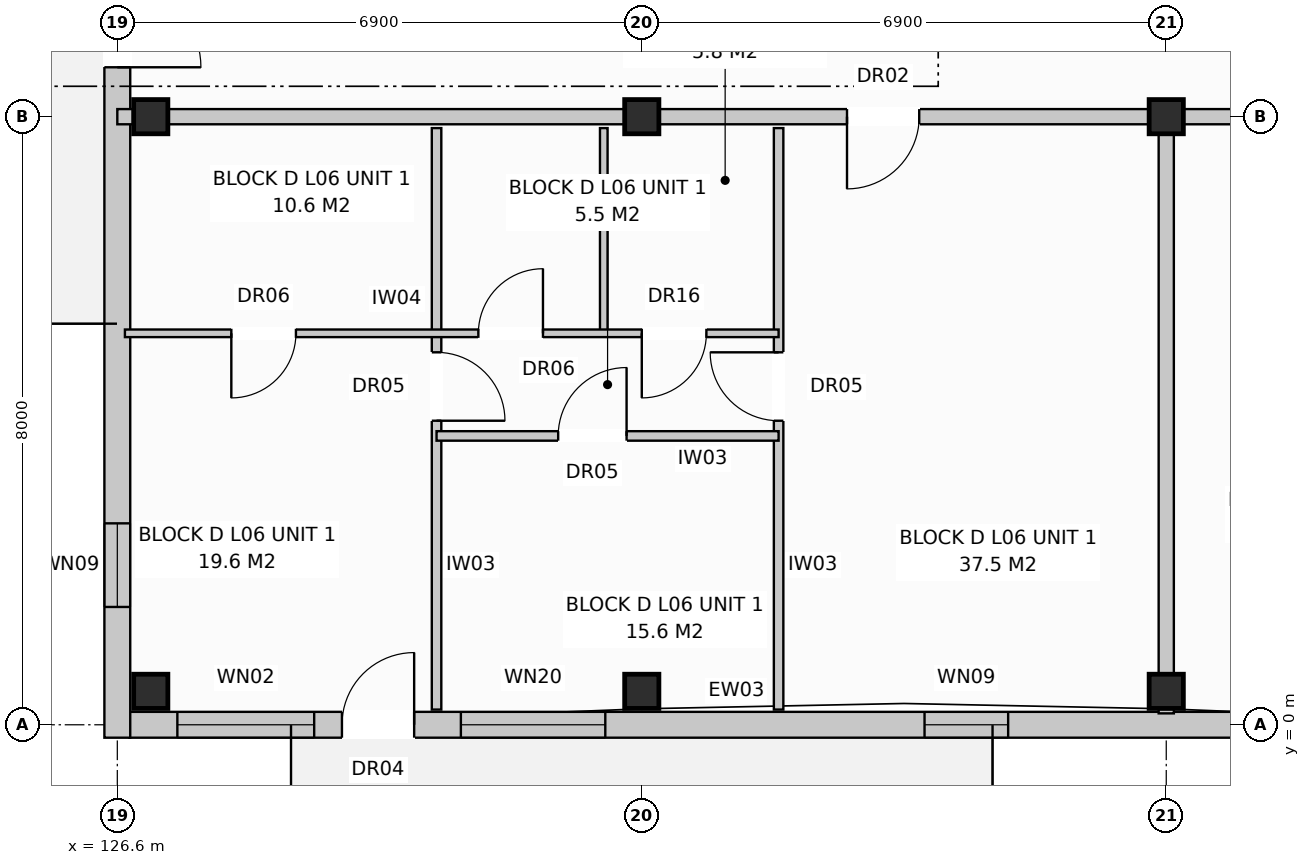
"""IFC4 building model, lengths in metres.
Left out: names, types, materials, properties, quantities, classifications, styles, units other than length and angle.
Written with IfcOpenShell. Run it as: python <this file> out.ifc"""

import sys

from ifc_helpers import new_model, si_unit, direction, frame, frame_2d, origin, origin_with_axes, origin_2d, place, context, subcontext, project, spatial, rectangle, extrude, element, fill, save


model = new_model("IFC4")
c1 = context("Model", 3, precision=1e-05, world=origin(), true_north=direction((0.0, 1.0)))
c2 = subcontext(c1, "Body", "Model", "MODEL_VIEW")
j1 = project(units=[si_unit("LENGTHUNIT", "METRE"), si_unit("PLANEANGLEUNIT", "RADIAN")], contexts=[c1])
p1 = place(None, origin())
s1 = spatial("IfcSite", under=j1, at=p1, CompositionType="ELEMENT")
p2 = place(p1, origin())
s2 = spatial("IfcBuilding", under=s1, at=p2, CompositionType="ELEMENT")
p3 = place(p2, frame((0.0, 0.0, 20.8)))
s3 = spatial("IfcBuildingStorey", under=s2, at=p3, CompositionType="ELEMENT", Elevation=20.8)
for number, where, z_axis, x_axis in (
    (1, (127.04, 0.44, 0.0), (0.0, 0.0, 1.0), (1.0, 0.0, 0.0)),
    (2, (127.04, 8.0, 0.0), (0.0, 0.0, 1.0), (1.0, 0.0, 0.0)),
    (3, (133.5, 0.44, 0.0), (0.0, 0.0, 1.0), (1.0, 0.0, 0.0)),
    (4, (133.5, 8.0, 0.0), (0.0, 0.0, 1.0), (1.0, 0.0, 0.0)),
    (5, (140.4, 0.44, 0.0), (0.0, 0.0, 1.0), (1.0, 0.0, 0.0)),
    (6, (140.4, 8.0, 0.0), (0.0, 0.0, 1.0), (1.0, 0.0, 0.0)),
):
    element("IfcColumn", number, at=place(p3, frame(where, z_axis=z_axis, x_axis=x_axis)), inside=s3, PredefinedType="COLUMN", context=c2, shape_type="SweptSolid", body=[
        extrude(rectangle(XDim=0.45, YDim=0.45, at=origin_2d()), origin(), (0.0, 0.0, 1.0), 3.2),
    ])
p4 = place(p3, frame((126.76, 0.0, 0.0), z_axis=(0.0, 0.0, 1.0), x_axis=(1.0, 0.0, 0.0)))
e7 = element("IfcWall", 7, at=p4, inside=s3, PredefinedType="STANDARD", context=c2, shape_type="SweptSolid", body=[
    extrude(rectangle(XDim=41.08, YDim=0.34, at=frame_2d((20.54, 0.0))), origin(), (0.0, 0.0, 1.0), 2.95),
])
p5 = place(p4, frame((2.795, 0.0, 0.0)))
e8 = element("IfcOpeningElement", 8, at=p5, cuts=e7, PredefinedType="OPENING", context=c2, shape_type="SweptSolid", body=[
    extrude(rectangle(XDim=0.95, YDim=2.1, at=frame_2d((0.475, 1.05))), frame((0.0, 0.182, 0.0), z_axis=(0.0, -1.0, 0.0), x_axis=(1.0, 0.0, 0.0)), (0.0, 0.0, 1.0), 0.364),
])
p6 = place(p4, frame((17.595, 0.0, 0.0)))
e9 = element("IfcOpeningElement", 9, at=p6, cuts=e7, PredefinedType="OPENING", context=c2, shape_type="SweptSolid", body=[
    extrude(rectangle(XDim=0.95, YDim=2.1, at=frame_2d((0.475, 1.05))), frame((0.0, 0.182, 0.0), z_axis=(0.0, -1.0, 0.0), x_axis=(1.0, 0.0, 0.0)), (0.0, 0.0, 1.0), 0.364),
])
p7 = place(p4, frame((30.095, 0.0, 0.0)))
e10 = element("IfcOpeningElement", 10, at=p7, cuts=e7, PredefinedType="OPENING", context=c2, shape_type="SweptSolid", body=[
    extrude(rectangle(XDim=0.95, YDim=2.1, at=frame_2d((0.475, 1.05))), frame((0.0, 0.182, 0.0), z_axis=(0.0, -1.0, 0.0), x_axis=(1.0, 0.0, 0.0)), (0.0, 0.0, 1.0), 0.364),
])
p8 = place(p4, frame((0.63, 0.0, 0.8)))
e11 = element("IfcOpeningElement", 11, at=p8, cuts=e7, PredefinedType="OPENING", context=c2, shape_type="SweptSolid", body=[
    extrude(rectangle(XDim=1.8, YDim=1.7, at=frame_2d((0.9, 0.85))), frame((0.0, 0.182, 0.0), z_axis=(0.0, -1.0, 0.0), x_axis=(1.0, 0.0, 0.0)), (0.0, 0.0, 1.0), 0.364),
])
p9 = place(p4, frame((4.36, 0.0, 0.72)))
e12 = element("IfcOpeningElement", 12, at=p9, cuts=e7, PredefinedType="OPENING", context=c2, shape_type="SweptSolid", body=[
    extrude(rectangle(XDim=1.9, YDim=1.85, at=frame_2d((0.95, 0.925))), frame((0.0, 0.182, 0.0), z_axis=(0.0, -1.0, 0.0), x_axis=(1.0, 0.0, 0.0)), (0.0, 0.0, 1.0), 0.364),
])
p10 = place(p4, frame((10.46, 0.0, 0.72)))
e13 = element("IfcOpeningElement", 13, at=p10, cuts=e7, PredefinedType="OPENING", context=c2, shape_type="SweptSolid", body=[
    extrude(rectangle(XDim=1.1, YDim=1.5, at=frame_2d((0.55, 0.75))), frame((0.0, 0.182, 0.0), z_axis=(0.0, -1.0, 0.0), x_axis=(1.0, 0.0, 0.0)), (0.0, 0.0, 1.0), 0.364),
])
p11 = place(p4, frame((15.76, 0.0, 0.72)))
e14 = element("IfcOpeningElement", 14, at=p11, cuts=e7, PredefinedType="OPENING", context=c2, shape_type="SweptSolid", body=[
    extrude(rectangle(XDim=1.1, YDim=1.5, at=frame_2d((0.55, 0.75))), frame((0.0, 0.182, 0.0), z_axis=(0.0, -1.0, 0.0), x_axis=(1.0, 0.0, 0.0)), (0.0, 0.0, 1.0), 0.364),
])
p12 = place(p4, frame((21.042, 0.0, 0.72)))
e15 = element("IfcOpeningElement", 15, at=p12, cuts=e7, PredefinedType="OPENING", context=c2, shape_type="SweptSolid", body=[
    extrude(rectangle(XDim=1.9, YDim=1.85, at=frame_2d((0.95, 0.925))), frame((0.0, 0.182, 0.0), z_axis=(0.0, -1.0, 0.0), x_axis=(1.0, 0.0, 0.0)), (0.0, 0.0, 1.0), 0.364),
])
p13 = place(p4, frame((24.66, 0.0, 0.72)))
e16 = element("IfcOpeningElement", 16, at=p13, cuts=e7, PredefinedType="OPENING", context=c2, shape_type="SweptSolid", body=[
    extrude(rectangle(XDim=1.1, YDim=1.5, at=frame_2d((0.55, 0.75))), frame((0.0, 0.182, 0.0), z_axis=(0.0, -1.0, 0.0), x_axis=(1.0, 0.0, 0.0)), (0.0, 0.0, 1.0), 0.364),
])
p14 = place(p4, frame((28.21, 0.0, 0.85)))
e17 = element("IfcOpeningElement", 17, at=p14, cuts=e7, PredefinedType="OPENING", context=c2, shape_type="SweptSolid", body=[
    extrude(rectangle(XDim=1.5, YDim=1.65, at=frame_2d((0.75, 0.825))), frame((0.0, 0.182, 0.0), z_axis=(0.0, -1.0, 0.0), x_axis=(1.0, 0.0, 0.0)), (0.0, 0.0, 1.0), 0.364),
])
p15 = place(p4, frame((31.86, 0.0, 0.72)))
e18 = element("IfcOpeningElement", 18, at=p15, cuts=e7, PredefinedType="OPENING", context=c2, shape_type="SweptSolid", body=[
    extrude(rectangle(XDim=1.9, YDim=1.85, at=frame_2d((0.95, 0.925))), frame((0.0, 0.182, 0.0), z_axis=(0.0, -1.0, 0.0), x_axis=(1.0, 0.0, 0.0)), (0.0, 0.0, 1.0), 0.364),
])
p16 = place(p4, frame((35.335, 0.0, 0.8)))
e19 = element("IfcOpeningElement", 19, at=p16, cuts=e7, PredefinedType="OPENING", context=c2, shape_type="SweptSolid", body=[
    extrude(rectangle(XDim=1.95, YDim=1.65, at=frame_2d((0.975, 0.825))), frame((0.0, 0.182, 0.0), z_axis=(0.0, -1.0, 0.0), x_axis=(1.0, 0.0, 0.0)), (0.0, 0.0, 1.0), 0.364),
])
p17 = place(p4, frame((38.65, 0.0, 0.8)))
e20 = element("IfcOpeningElement", 20, at=p17, cuts=e7, PredefinedType="OPENING", context=c2, shape_type="SweptSolid", body=[
    extrude(rectangle(XDim=1.8, YDim=1.7, at=frame_2d((0.9, 0.85))), frame((0.0, 0.182, 0.0), z_axis=(0.0, -1.0, 0.0), x_axis=(1.0, 0.0, 0.0)), (0.0, 0.0, 1.0), 0.364),
])
p18 = place(p3, frame((126.6, -0.17, 0.0), z_axis=(0.0, 0.0, 1.0), x_axis=(0.0, 1.0, 0.0)))
e21 = element("IfcWall", 21, at=p18, inside=s3, PredefinedType="STANDARD", context=c2, shape_type="SweptSolid", body=[
    extrude(rectangle(XDim=18.74, YDim=0.34, at=frame_2d((9.37, 0.0))), origin(), (0.0, 0.0, 1.0), 2.95),
])
p19 = place(p18, frame((8.82, 0.0, 0.0)))
e22 = element("IfcOpeningElement", 22, at=p19, cuts=e21, PredefinedType="OPENING", context=c2, shape_type="SweptSolid", body=[
    extrude(rectangle(XDim=1.1, YDim=2.1, at=frame_2d((0.55, 1.05))), frame((0.0, 0.182, 0.0), z_axis=(0.0, -1.0, 0.0), x_axis=(1.0, 0.0, 0.0)), (0.0, 0.0, 1.0), 0.364),
])
p20 = place(p18, frame((1.72, 0.0, 0.72)))
e23 = element("IfcOpeningElement", 23, at=p20, cuts=e21, PredefinedType="OPENING", context=c2, shape_type="SweptSolid", body=[
    extrude(rectangle(XDim=1.1, YDim=1.5, at=frame_2d((0.55, 0.75))), frame((0.0, 0.182, 0.0), z_axis=(0.0, -1.0, 0.0), x_axis=(1.0, 0.0, 0.0)), (0.0, 0.0, 1.0), 0.364),
])
p21 = place(p3, frame((140.4, 7.85, 0.0), z_axis=(0.0, 0.0, 1.0), x_axis=(0.0, -1.0, 0.0)))
e24 = element("IfcWall", 24, at=p21, inside=s3, PredefinedType="PARTITIONING", context=c2, shape_type="SweptSolid", body=[
    extrude(rectangle(XDim=7.7, YDim=0.2, at=frame_2d((3.85, 0.0))), origin(), (0.0, 0.0, 1.0), 2.95),
])
p22 = place(p3, frame((126.6, 8.0, 0.0), z_axis=(0.0, 0.0, 1.0), x_axis=(1.0, 0.0, 0.0)))
e25 = element("IfcWall", 25, at=p22, inside=s3, PredefinedType="PARTITIONING", context=c2, shape_type="SweptSolid", body=[
    extrude(rectangle(XDim=13.8, YDim=0.2, at=frame_2d((6.9, 0.0))), origin(), (0.0, 0.0, 1.0), 2.39),
])
p23 = place(p22, frame((9.6, 0.0, 0.0)))
e26 = element("IfcOpeningElement", 26, at=p23, cuts=e25, PredefinedType="OPENING", context=c2, shape_type="SweptSolid", body=[
    extrude(rectangle(XDim=0.95, YDim=2.15, at=frame_2d((0.475, 1.075))), frame((0.0, 0.112, 0.0), z_axis=(0.0, -1.0, 0.0), x_axis=(1.0, 0.0, 0.0)), (0.0, 0.0, 1.0), 0.224),
])
p24 = place(p3, frame((135.3, 7.85, 0.0), z_axis=(0.0, 0.0, 1.0), x_axis=(0.0, -1.0, 0.0)))
e27 = element("IfcWall", 27, at=p24, inside=s3, PredefinedType="PARTITIONING", context=c2, shape_type="SweptSolid", body=[
    extrude(rectangle(XDim=7.65, YDim=0.125, at=frame_2d((3.825, 0.0))), origin(), (0.0, 0.0, 1.0), 2.95),
])
p25 = place(p24, frame((2.95, 0.0, 0.0)))
e28 = element("IfcOpeningElement", 28, at=p25, cuts=e27, PredefinedType="OPENING", context=c2, shape_type="SweptSolid", body=[
    extrude(rectangle(XDim=0.9, YDim=2.1, at=frame_2d((0.45, 1.05))), frame((0.0, 0.074, 0.0), z_axis=(0.0, -1.0, 0.0), x_axis=(1.0, 0.0, 0.0)), (0.0, 0.0, 1.0), 0.149),
])
p26 = place(p3, frame((130.8, 7.85, 0.0), z_axis=(0.0, 0.0, 1.0), x_axis=(0.0, -1.0, 0.0)))
e29 = element("IfcWall", 29, at=p26, inside=s3, PredefinedType="PARTITIONING", context=c2, shape_type="SweptSolid", body=[
    extrude(rectangle(XDim=7.65, YDim=0.125, at=frame_2d((3.825, 0.0))), origin(), (0.0, 0.0, 1.0), 2.95),
])
p27 = place(p26, frame((2.95, 0.0, 0.0)))
e30 = element("IfcOpeningElement", 30, at=p27, cuts=e29, PredefinedType="OPENING", context=c2, shape_type="SweptSolid", body=[
    extrude(rectangle(XDim=0.9, YDim=2.1, at=frame_2d((0.45, 1.05))), frame((0.0, 0.074, 0.0), z_axis=(0.0, -1.0, 0.0), x_axis=(1.0, 0.0, 0.0)), (0.0, 0.0, 1.0), 0.149),
])
p28 = place(p3, frame((133.0, 7.85, 0.0), z_axis=(0.0, 0.0, 1.0), x_axis=(0.0, -1.0, 0.0)))
e31 = element("IfcWall", 31, at=p28, inside=s3, PredefinedType="PARTITIONING", context=c2, shape_type="SweptSolid", body=[
    extrude(rectangle(XDim=2.7, YDim=0.1, at=frame_2d((1.35, 0.0))), origin(), (0.0, 0.0, 1.0), 2.95),
])
p29 = place(p3, frame((126.7, 5.15, 0.0), z_axis=(0.0, 0.0, 1.0), x_axis=(1.0, 0.0, 0.0)))
e32 = element("IfcWall", 32, at=p29, inside=s3, PredefinedType="PARTITIONING", context=c2, shape_type="SweptSolid", body=[
    extrude(rectangle(XDim=8.6, YDim=0.1, at=frame_2d((4.3, 0.0))), origin(), (0.0, 0.0, 1.0), 2.95),
])
p30 = place(p29, frame((1.4, 0.0, 0.0)))
e33 = element("IfcOpeningElement", 33, at=p30, cuts=e32, PredefinedType="OPENING", context=c2, shape_type="SweptSolid", body=[
    extrude(rectangle(XDim=0.85, YDim=2.05, at=frame_2d((0.425, 1.025))), frame((0.0, 0.062, 0.0), z_axis=(0.0, -1.0, 0.0), x_axis=(1.0, 0.0, 0.0)), (0.0, 0.0, 1.0), 0.124),
])
p31 = place(p29, frame((4.65, 0.0, 0.0)))
e34 = element("IfcOpeningElement", 34, at=p31, cuts=e32, PredefinedType="OPENING", context=c2, shape_type="SweptSolid", body=[
    extrude(rectangle(XDim=0.85, YDim=2.05, at=frame_2d((0.425, 1.025))), frame((0.0, 0.062, 0.0), z_axis=(0.0, -1.0, 0.0), x_axis=(1.0, 0.0, 0.0)), (0.0, 0.0, 1.0), 0.124),
])
p32 = place(p29, frame((6.8, 0.0, 0.0)))
e35 = element("IfcOpeningElement", 35, at=p32, cuts=e32, PredefinedType="OPENING", context=c2, shape_type="SweptSolid", body=[
    extrude(rectangle(XDim=0.85, YDim=2.1, at=frame_2d((0.425, 1.05))), frame((0.0, 0.062, 0.0), z_axis=(0.0, -1.0, 0.0), x_axis=(1.0, 0.0, 0.0)), (0.0, 0.0, 1.0), 0.124),
])
p33 = place(p3, frame((130.8, 3.8, 0.0), z_axis=(0.0, 0.0, 1.0), x_axis=(1.0, 0.0, 0.0)))
e36 = element("IfcWall", 36, at=p33, inside=s3, PredefinedType="PARTITIONING", context=c2, shape_type="SweptSolid", body=[
    extrude(rectangle(XDim=4.5, YDim=0.125, at=frame_2d((2.25, 0.0))), origin(), (0.0, 0.0, 1.0), 2.95),
])
p34 = place(p33, frame((1.6, 0.0, 0.0)))
e37 = element("IfcOpeningElement", 37, at=p34, cuts=e36, PredefinedType="OPENING", context=c2, shape_type="SweptSolid", body=[
    extrude(rectangle(XDim=0.9, YDim=2.1, at=frame_2d((0.45, 1.05))), frame((0.0, 0.074, 0.0), z_axis=(0.0, -1.0, 0.0), x_axis=(1.0, 0.0, 0.0)), (0.0, 0.0, 1.0), 0.149),
])
p35 = place(p3, frame((140.4, 8.0, 0.0), z_axis=(0.0, 0.0, 1.0), x_axis=(1.0, 0.0, 0.0)))
e38 = element("IfcWall", 38, at=p35, inside=s3, PredefinedType="PARTITIONING", context=c2, shape_type="SweptSolid", body=[
    extrude(rectangle(XDim=13.8, YDim=0.2, at=frame_2d((6.9, 0.0))), origin(), (0.0, 0.0, 1.0), 2.39),
])
p36 = place(p35, frame((2.4, 0.0, 0.0)))
e39 = element("IfcOpeningElement", 39, at=p36, cuts=e38, PredefinedType="OPENING", context=c2, shape_type="SweptSolid", body=[
    extrude(rectangle(XDim=0.95, YDim=2.15, at=frame_2d((0.475, 1.075))), frame((0.0, 0.112, 0.0), z_axis=(0.0, -1.0, 0.0), x_axis=(1.0, 0.0, 0.0)), (0.0, 0.0, 1.0), 0.224),
])
p37 = place(p5, origin_with_axes())
e40 = element("IfcDoor", 40, at=p37, inside=s3, OperationType="SINGLE_SWING_RIGHT", PredefinedType="DOOR", context=c2, shape_type="SweptSolid", body=[
    extrude(rectangle(XDim=0.95, YDim=2.1, at=frame_2d((0.475, 1.05))), frame((0.0, 0.025, 0.0), z_axis=(0.0, -1.0, 0.0), x_axis=(1.0, 0.0, 0.0)), (0.0, 0.0, 1.0), 0.05),
])
fill(e8, e40)
p38 = place(p8, origin_with_axes())
e41 = element("IfcWindow", 41, at=p38, inside=s3, PartitioningType="SINGLE_PANEL", PredefinedType="WINDOW", context=c2, shape_type="SweptSolid", body=[
    extrude(rectangle(XDim=1.8, YDim=1.7, at=frame_2d((0.9, 0.85))), frame((0.0, 0.03, 0.0), z_axis=(0.0, -1.0, 0.0), x_axis=(1.0, 0.0, 0.0)), (0.0, 0.0, 1.0), 0.06),
])
fill(e11, e41)
p39 = place(p9, origin_with_axes())
e42 = element("IfcWindow", 42, at=p39, inside=s3, PartitioningType="SINGLE_PANEL", PredefinedType="WINDOW", context=c2, shape_type="SweptSolid", body=[
    extrude(rectangle(XDim=1.9, YDim=1.85, at=frame_2d((0.95, 0.925))), frame((0.0, 0.03, 0.0), z_axis=(0.0, -1.0, 0.0), x_axis=(1.0, 0.0, 0.0)), (0.0, 0.0, 1.0), 0.06),
])
fill(e12, e42)
p40 = place(p10, origin_with_axes())
e43 = element("IfcWindow", 43, at=p40, inside=s3, PartitioningType="SINGLE_PANEL", PredefinedType="WINDOW", context=c2, shape_type="SweptSolid", body=[
    extrude(rectangle(XDim=1.1, YDim=1.5, at=frame_2d((0.55, 0.75))), frame((0.0, 0.03, 0.0), z_axis=(0.0, -1.0, 0.0), x_axis=(1.0, 0.0, 0.0)), (0.0, 0.0, 1.0), 0.06),
])
fill(e13, e43)
p41 = place(p19, frame((1.1, 0.0, 0.0), z_axis=(0.0, 0.0, 1.0), x_axis=(-1.0, 0.0, 0.0)))
e44 = element("IfcDoor", 44, at=p41, inside=s3, OperationType="SINGLE_SWING_LEFT", PredefinedType="DOOR", context=c2, shape_type="SweptSolid", body=[
    extrude(rectangle(XDim=1.1, YDim=2.1, at=frame_2d((0.55, 1.05))), frame((0.0, 0.025, 0.0), z_axis=(0.0, -1.0, 0.0), x_axis=(1.0, 0.0, 0.0)), (0.0, 0.0, 1.0), 0.05),
])
fill(e22, e44)
p42 = place(p20, origin_with_axes())
e45 = element("IfcWindow", 45, at=p42, inside=s3, PartitioningType="SINGLE_PANEL", PredefinedType="WINDOW", context=c2, shape_type="SweptSolid", body=[
    extrude(rectangle(XDim=1.1, YDim=1.5, at=frame_2d((0.55, 0.75))), frame((0.0, 0.03, 0.0), z_axis=(0.0, -1.0, 0.0), x_axis=(1.0, 0.0, 0.0)), (0.0, 0.0, 1.0), 0.06),
])
fill(e23, e45)
p43 = place(p23, frame((0.95, 0.0, 0.0), z_axis=(0.0, 0.0, 1.0), x_axis=(-1.0, 0.0, 0.0)))
e46 = element("IfcDoor", 46, at=p43, inside=s3, OperationType="SINGLE_SWING_LEFT", PredefinedType="DOOR", context=c2, shape_type="SweptSolid", body=[
    extrude(rectangle(XDim=0.95, YDim=2.15, at=frame_2d((0.475, 1.075))), frame((0.0, 0.025, 0.0), z_axis=(0.0, -1.0, 0.0), x_axis=(1.0, 0.0, 0.0)), (0.0, 0.0, 1.0), 0.05),
])
fill(e26, e46)
p44 = place(p25, frame((0.9, 0.0, 0.0), z_axis=(0.0, 0.0, 1.0), x_axis=(-1.0, 0.0, 0.0)))
e47 = element("IfcDoor", 47, at=p44, inside=s3, OperationType="SINGLE_SWING_LEFT", PredefinedType="DOOR", context=c2, shape_type="SweptSolid", body=[
    extrude(rectangle(XDim=0.9, YDim=2.1, at=frame_2d((0.45, 1.05))), frame((0.0, 0.025, 0.0), z_axis=(0.0, -1.0, 0.0), x_axis=(1.0, 0.0, 0.0)), (0.0, 0.0, 1.0), 0.05),
])
fill(e28, e47)
p45 = place(p27, origin_with_axes())
e48 = element("IfcDoor", 48, at=p45, inside=s3, OperationType="SINGLE_SWING_RIGHT", PredefinedType="DOOR", context=c2, shape_type="SweptSolid", body=[
    extrude(rectangle(XDim=0.9, YDim=2.1, at=frame_2d((0.45, 1.05))), frame((0.0, 0.025, 0.0), z_axis=(0.0, -1.0, 0.0), x_axis=(1.0, 0.0, 0.0)), (0.0, 0.0, 1.0), 0.05),
])
fill(e30, e48)
p46 = place(p30, frame((0.85, 0.0, 0.0), z_axis=(0.0, 0.0, 1.0), x_axis=(-1.0, 0.0, 0.0)))
e49 = element("IfcDoor", 49, at=p46, inside=s3, OperationType="SINGLE_SWING_LEFT", PredefinedType="DOOR", context=c2, shape_type="SweptSolid", body=[
    extrude(rectangle(XDim=0.85, YDim=2.05, at=frame_2d((0.425, 1.025))), frame((0.0, 0.025, 0.0), z_axis=(0.0, -1.0, 0.0), x_axis=(1.0, 0.0, 0.0)), (0.0, 0.0, 1.0), 0.05),
])
fill(e33, e49)
p47 = place(p31, origin_with_axes())
e50 = element("IfcDoor", 50, at=p47, inside=s3, OperationType="SINGLE_SWING_RIGHT", PredefinedType="DOOR", context=c2, shape_type="SweptSolid", body=[
    extrude(rectangle(XDim=0.85, YDim=2.05, at=frame_2d((0.425, 1.025))), frame((0.0, 0.025, 0.0), z_axis=(0.0, -1.0, 0.0), x_axis=(1.0, 0.0, 0.0)), (0.0, 0.0, 1.0), 0.05),
])
fill(e34, e50)
p48 = place(p32, frame((0.85, 0.0, 0.0), z_axis=(0.0, 0.0, 1.0), x_axis=(-1.0, 0.0, 0.0)))
e51 = element("IfcDoor", 51, at=p48, inside=s3, OperationType="SINGLE_SWING_LEFT", PredefinedType="DOOR", context=c2, shape_type="SweptSolid", body=[
    extrude(rectangle(XDim=0.85, YDim=2.1, at=frame_2d((0.425, 1.05))), frame((0.0, 0.025, 0.0), z_axis=(0.0, -1.0, 0.0), x_axis=(1.0, 0.0, 0.0)), (0.0, 0.0, 1.0), 0.05),
])
fill(e35, e51)
p49 = place(p34, origin_with_axes())
e52 = element("IfcDoor", 52, at=p49, inside=s3, OperationType="SINGLE_SWING_RIGHT", PredefinedType="DOOR", context=c2, shape_type="SweptSolid", body=[
    extrude(rectangle(XDim=0.9, YDim=2.1, at=frame_2d((0.45, 1.05))), frame((0.0, 0.025, 0.0), z_axis=(0.0, -1.0, 0.0), x_axis=(1.0, 0.0, 0.0)), (0.0, 0.0, 1.0), 0.05),
])
fill(e37, e52)
save(model, sys.argv[1])
